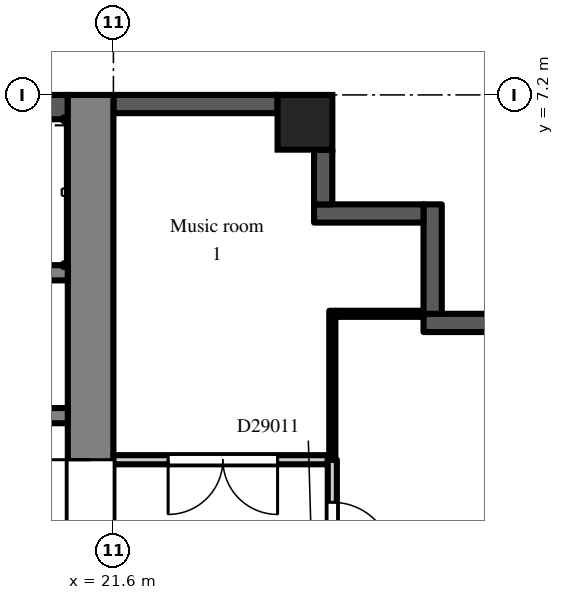
"""IFC4 building model, lengths in metres.
Left out: names, types, materials, properties, quantities, classifications, styles, units other than length and angle.
Written with IfcOpenShell. Run it as: python <this file> out.ifc"""

import sys

from ifc_helpers import new_model, si_unit, direction, frame, frame_2d, origin, origin_2d, place, context, subcontext, project, spatial, rectangle, extrude, element, fill, save


model = new_model("IFC4")
c1 = context("Model", 3, precision=1e-05, world=origin(), true_north=direction((0.0, 1.0)))
c2 = subcontext(c1, "Body", "Model", "MODEL_VIEW")
j1 = project(units=[si_unit("LENGTHUNIT", "METRE"), si_unit("PLANEANGLEUNIT", "RADIAN")], contexts=[c1])
p1 = place(None, origin())
s1 = spatial("IfcSite", under=j1, at=p1, CompositionType="ELEMENT")
p2 = place(p1, origin())
s2 = spatial("IfcBuilding", under=s1, at=p2, CompositionType="ELEMENT")
p3 = place(p2, frame((0.0, 0.0, 201.9)))
s3 = spatial("IfcBuildingStorey", under=s2, at=p3, CompositionType="ELEMENT", Elevation=201.9)
p4 = place(p3, frame((24.75, 6.75, 0.0), z_axis=(0.0, 0.0, 1.0), x_axis=(1.0, 0.0, 0.0)))
e1 = element("IfcColumn", 1, at=p4, inside=s3, PredefinedType="COLUMN", context=c2, shape_type="SweptSolid", body=[
    extrude(rectangle(XDim=0.9, YDim=0.9, at=origin_2d()), origin(), (0.0, 0.0, 1.0), 3.0),
])
p5 = place(p3, frame((27.9, 3.45, 0.0), z_axis=(0.0, 0.0, 1.0), x_axis=(-1.0, 0.0, 0.0)))
e2 = element("IfcWall", 2, at=p5, inside=s3, PredefinedType="SOLIDWALL", context=c2, shape_type="SweptSolid", body=[
    extrude(rectangle(XDim=1.2, YDim=0.3, at=frame_2d((0.6, 0.0))), origin(), (0.0, 0.0, 1.0), 2.6),
])
p6 = place(p3, frame((26.85, 3.6, 0.0), z_axis=(0.0, 0.0, 1.0), x_axis=(0.0, 1.0, 0.0)))
e3 = element("IfcWall", 3, at=p6, inside=s3, PredefinedType="SOLIDWALL", context=c2, shape_type="SweptSolid", body=[
    extrude(rectangle(XDim=1.8, YDim=0.3, at=frame_2d((0.9, 0.0))), origin(), (0.0, 0.0, 1.0), 2.6),
])
p7 = place(p3, frame((26.7, 5.25, 0.0), z_axis=(0.0, 0.0, 1.0), x_axis=(-1.0, 0.0, 0.0)))
e4 = element("IfcWall", 4, at=p7, inside=s3, PredefinedType="SOLIDWALL", context=c2, shape_type="SweptSolid", body=[
    extrude(rectangle(XDim=1.8, YDim=0.3, at=frame_2d((0.9, 0.0))), origin(), (0.0, 0.0, 1.0), 2.6),
])
p8 = place(p3, frame((25.05, 5.4, 0.0), z_axis=(0.0, 0.0, 1.0), x_axis=(0.0, 1.0, 0.0)))
e5 = element("IfcWall", 5, at=p8, inside=s3, PredefinedType="SOLIDWALL", context=c2, shape_type="SweptSolid", body=[
    extrude(rectangle(XDim=0.9, YDim=0.3, at=frame_2d((0.45, 0.0))), origin(), (0.0, 0.0, 1.0), 2.6),
])
p9 = place(p3, frame((24.3, 7.05, 0.0), z_axis=(0.0, 0.0, 1.0), x_axis=(-1.0, 0.0, 0.0)))
e6 = element("IfcWall", 6, at=p9, inside=s3, PredefinedType="SOLIDWALL", context=c2, shape_type="SweptSolid", body=[
    extrude(rectangle(XDim=2.7, YDim=0.3, at=frame_2d((1.35, 0.0))), origin(), (0.0, 0.0, 1.0), 2.3),
])
p10 = place(p3, frame((21.225, -7.2, 0.0), z_axis=(0.0, 0.0, 1.0), x_axis=(0.0, 1.0, 0.0)))
e7 = element("IfcWall", 7, at=p10, inside=s3, PredefinedType="SHEAR", context=c2, shape_type="SweptSolid", body=[
    extrude(rectangle(XDim=14.4, YDim=0.75, at=frame_2d((7.2, 0.0))), origin(), (0.0, 0.0, 1.0), 2.6),
])
p11 = place(p10, frame((6.0, 0.0, 0.0)))
e8 = element("IfcOpeningElement", 8, at=p11, cuts=e7, PredefinedType="OPENING", context=c2, shape_type="SweptSolid", body=[
    extrude(rectangle(XDim=2.4, YDim=2.2, at=frame_2d((1.2, 1.1))), frame((0.0, 0.385, 0.0), z_axis=(0.0, -1.0, 0.0), x_axis=(1.0, 0.0, 0.0)), (0.0, 0.0, 1.0), 0.77),
])
p12 = place(p3, frame((7.9, 7.0, 0.0), z_axis=(0.0, 0.0, 1.0), x_axis=(1.0, 0.0, 0.0)))
e9 = element("IfcWall", 9, at=p12, inside=s3, PredefinedType="SHEAR", context=c2, shape_type="SweptSolid", body=[
    extrude(rectangle(XDim=12.95, YDim=0.4, at=frame_2d((6.475, 0.0))), origin(), (0.0, 0.0, 1.0), 2.6),
])
p13 = place(p3, frame((7.9, 1.925, 0.0), z_axis=(0.0, 0.0, 1.0), x_axis=(1.0, 0.0, 0.0)))
e10 = element("IfcWall", 10, at=p13, inside=s3, PredefinedType="SHEAR", context=c2, shape_type="SweptSolid", body=[
    extrude(rectangle(XDim=12.95, YDim=0.25, at=frame_2d((6.475, 0.0))), origin(), (0.0, 0.0, 1.0), 2.6),
])
p14 = place(p13, frame((4.825, 0.0, 0.0)))
e11 = element("IfcOpeningElement", 11, at=p14, cuts=e10, PredefinedType="OPENING", context=c2, shape_type="SweptSolid", body=[
    extrude(rectangle(XDim=1.1, YDim=2.1, at=frame_2d((0.55, 1.05))), frame((0.0, 0.135, 0.0), z_axis=(0.0, -1.0, 0.0), x_axis=(1.0, 0.0, 0.0)), (0.0, 0.0, 1.0), 0.27),
])
p15 = place(p13, frame((7.025, 0.0, 0.0)))
e12 = element("IfcOpeningElement", 12, at=p15, cuts=e10, PredefinedType="OPENING", context=c2, shape_type="SweptSolid", body=[
    extrude(rectangle(XDim=1.1, YDim=2.1, at=frame_2d((0.55, 1.05))), frame((0.0, 0.135, 0.0), z_axis=(0.0, -1.0, 0.0), x_axis=(1.0, 0.0, 0.0)), (0.0, 0.0, 1.0), 0.27),
])
p16 = place(p13, frame((9.225, 0.0, 0.0)))
e13 = element("IfcOpeningElement", 13, at=p16, cuts=e10, PredefinedType="OPENING", context=c2, shape_type="SweptSolid", body=[
    extrude(rectangle(XDim=1.1, YDim=2.1, at=frame_2d((0.55, 1.05))), frame((0.0, 0.135, 0.0), z_axis=(0.0, -1.0, 0.0), x_axis=(1.0, 0.0, 0.0)), (0.0, 0.0, 1.0), 0.27),
])
p17 = place(p13, frame((0.525, 0.0, 0.0)))
e14 = element("IfcOpeningElement", 14, at=p17, cuts=e10, PredefinedType="OPENING", context=c2, shape_type="SweptSolid", body=[
    extrude(rectangle(XDim=0.9, YDim=2.1, at=frame_2d((0.45, 1.05))), frame((0.0, 0.135, 0.0), z_axis=(0.0, -1.0, 0.0), x_axis=(1.0, 0.0, 0.0)), (0.0, 0.0, 1.0), 0.27),
])
p18 = place(p13, frame((2.625, 0.0, 0.0)))
e15 = element("IfcOpeningElement", 15, at=p18, cuts=e10, PredefinedType="OPENING", context=c2, shape_type="SweptSolid", body=[
    extrude(rectangle(XDim=1.1, YDim=2.1, at=frame_2d((0.55, 1.05))), frame((0.0, 0.135, 0.0), z_axis=(0.0, -1.0, 0.0), x_axis=(1.0, 0.0, 0.0)), (0.0, 0.0, 1.0), 0.27),
])
p19 = place(p13, frame((11.525, 0.0, 0.0)))
e16 = element("IfcOpeningElement", 16, at=p19, cuts=e10, PredefinedType="OPENING", context=c2, shape_type="SweptSolid", body=[
    extrude(rectangle(XDim=0.9, YDim=2.1, at=frame_2d((0.45, 1.05))), frame((0.0, 0.135, 0.0), z_axis=(0.0, -1.0, 0.0), x_axis=(1.0, 0.0, 0.0)), (0.0, 0.0, 1.0), 0.27),
])
p20 = place(p3, frame((12.3, 4.275, 0.0), z_axis=(0.0, 0.0, 1.0), x_axis=(1.0, 0.0, 0.0)))
e17 = element("IfcWall", 17, at=p20, inside=s3, PredefinedType="SHEAR", context=c2, shape_type="SweptSolid", body=[
    extrude(rectangle(XDim=8.55, YDim=0.25, at=frame_2d((4.275, 0.0))), origin(), (0.0, 0.0, 1.0), 2.6),
])
p21 = place(p3, frame((21.6, 1.2, 0.0), z_axis=(0.0, 0.0, 1.0), x_axis=(1.0, 0.0, 0.0)))
e18 = element("IfcWall", 18, at=p21, inside=s3, PredefinedType="PARTITIONING", context=c2, shape_type="SweptSolid", body=[
    extrude(rectangle(XDim=3.525, YDim=0.15, at=frame_2d((1.762, 0.0))), origin(), (0.0, 0.0, 1.0), 2.6),
])
p22 = place(p21, frame((0.9, 0.0, 0.0)))
e19 = element("IfcOpeningElement", 19, at=p22, cuts=e18, PredefinedType="OPENING", context=c2, shape_type="SweptSolid", body=[
    extrude(rectangle(XDim=1.8, YDim=2.1, at=frame_2d((0.9, 1.05))), frame((0.0, 0.085, 0.0), z_axis=(0.0, -1.0, 0.0), x_axis=(1.0, 0.0, 0.0)), (0.0, 0.0, 1.0), 0.17),
])
p23 = place(p3, frame((25.2, -1.2, 0.0), z_axis=(0.0, 0.0, 1.0), x_axis=(0.0, 1.0, 0.0)))
e20 = element("IfcWall", 20, at=p23, inside=s3, PredefinedType="PARTITIONING", context=c2, shape_type="SweptSolid", body=[
    extrude(rectangle(XDim=2.4, YDim=0.15, at=frame_2d((1.2, 0.0))), origin(), (0.0, 0.0, 1.0), 2.6),
])
p24 = place(p23, frame((0.7, 0.0, 0.0)))
e21 = element("IfcOpeningElement", 21, at=p24, cuts=e20, PredefinedType="OPENING", context=c2, shape_type="SweptSolid", body=[
    extrude(rectangle(XDim=1.0, YDim=2.1, at=frame_2d((0.5, 1.05))), frame((0.0, 0.085, 0.0), z_axis=(0.0, -1.0, 0.0), x_axis=(1.0, 0.0, 0.0)), (0.0, 0.0, 1.0), 0.17),
])
p25 = place(p3, frame((25.2, 1.2, 0.0), z_axis=(0.0, 0.0, 1.0), x_axis=(0.0, 1.0, 0.0)))
e22 = element("IfcWall", 22, at=p25, inside=s3, PredefinedType="PARTITIONING", context=c2, shape_type="SweptSolid", body=[
    extrude(rectangle(XDim=2.45, YDim=0.1, at=frame_2d((1.225, 0.0))), origin(), (0.0, 0.0, 1.0), 2.6),
])
p26 = place(p3, frame((25.25, 3.6, 0.0), z_axis=(0.0, 0.0, 1.0), x_axis=(1.0, 0.0, 0.0)))
e23 = element("IfcWall", 23, at=p26, inside=s3, PredefinedType="PARTITIONING", context=c2, shape_type="SweptSolid", body=[
    extrude(rectangle(XDim=1.45, YDim=0.1, at=frame_2d((0.725, 0.0))), origin(), (0.0, 0.0, 1.0), 2.6),
])
p27 = place(p11, origin())
e24 = element("IfcDoor", 24, at=p27, inside=s3, OperationType="DOUBLE_DOOR_DOUBLE_SWING", PredefinedType="DOOR", context=c2, shape_type="SweptSolid", body=[
    extrude(rectangle(XDim=2.4, YDim=2.2, at=frame_2d((1.2, 1.1))), frame((0.0, 0.025, 0.0), z_axis=(0.0, -1.0, 0.0), x_axis=(1.0, 0.0, 0.0)), (0.0, 0.0, 1.0), 0.05),
])
fill(e8, e24)
p28 = place(p24, frame((1.0, 0.0, 0.0), z_axis=(0.0, 0.0, 1.0), x_axis=(-1.0, 0.0, 0.0)))
e25 = element("IfcDoor", 25, at=p28, inside=s3, OperationType="SINGLE_SWING_RIGHT", PredefinedType="DOOR", context=c2, shape_type="SweptSolid", body=[
    extrude(rectangle(XDim=1.0, YDim=2.1, at=frame_2d((0.5, 1.05))), frame((0.0, 0.025, 0.0), z_axis=(0.0, -1.0, 0.0), x_axis=(1.0, 0.0, 0.0)), (0.0, 0.0, 1.0), 0.05),
])
fill(e21, e25)
p29 = place(p22, frame((1.8, 0.0, 0.0), z_axis=(0.0, 0.0, 1.0), x_axis=(-1.0, 0.0, 0.0)))
e26 = element("IfcDoor", 26, at=p29, inside=s3, OperationType="DOUBLE_DOOR_DOUBLE_SWING", PredefinedType="DOOR", context=c2, shape_type="SweptSolid", body=[
    extrude(rectangle(XDim=1.8, YDim=2.1, at=frame_2d((0.9, 1.05))), frame((0.0, 0.025, 0.0), z_axis=(0.0, -1.0, 0.0), x_axis=(1.0, 0.0, 0.0)), (0.0, 0.0, 1.0), 0.05),
])
fill(e19, e26)
save(model, sys.argv[1])
